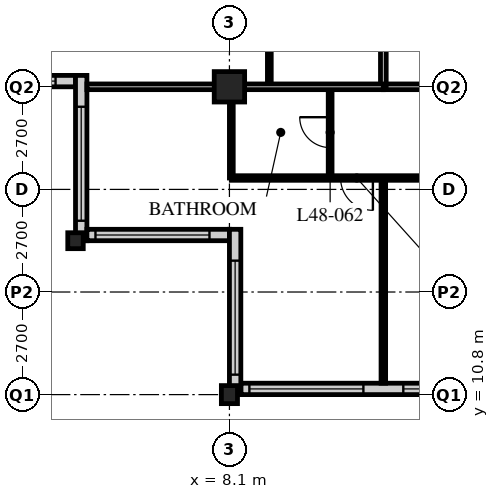
"""IFC4 building model, lengths in metres.
Left out: names, types, materials, properties, quantities, classifications, styles, units other than length and angle.
Written with IfcOpenShell. Run it as: python <this file> out.ifc"""

import sys

from ifc_helpers import new_model, si_unit, direction, frame, frame_2d, origin, origin_2d, place, context, subcontext, project, spatial, rectangle, hollow_rectangle, i_section, extrude, element, fill, save


model = new_model("IFC4")
c1 = context("Model", 3, precision=1e-05, world=origin(), true_north=direction((0.0, 1.0)))
c2 = subcontext(c1, "Body", "Model", "MODEL_VIEW")
j1 = project(units=[si_unit("LENGTHUNIT", "METRE"), si_unit("PLANEANGLEUNIT", "RADIAN")], contexts=[c1])
p1 = place(None, origin())
s1 = spatial("IfcSite", under=j1, at=p1, CompositionType="ELEMENT")
p2 = place(p1, origin())
s2 = spatial("IfcBuilding", under=s1, at=p2, CompositionType="ELEMENT")
p3 = place(p2, frame((0.0, 0.0, 188.4)))
s3 = spatial("IfcBuildingStorey", under=s2, at=p3, CompositionType="ELEMENT", Elevation=188.4)
p4 = place(p3, frame((4.05, 14.85, 0.0), z_axis=(0.0, 0.0, 1.0), x_axis=(1.0, 0.0, 0.0)))
e1 = element("IfcColumn", 1, at=p4, inside=s3, PredefinedType="COLUMN", context=c2, shape_type="SweptSolid", body=[
    extrude(i_section(OverallWidth=0.407, OverallDepth=0.419, WebThickness=0.031, FlangeThickness=0.049, FilletRadius=0.015, at=origin_2d()), origin(), (0.0, 0.0, 1.0), 3.6),
])
p5 = place(p3, frame((8.1, 10.8, 0.0), z_axis=(0.0, 0.0, 1.0), x_axis=(1.0, 0.0, 0.0)))
e2 = element("IfcColumn", 2, at=p5, inside=s3, PredefinedType="COLUMN", context=c2, shape_type="SweptSolid", body=[
    extrude(i_section(OverallWidth=0.424, OverallDepth=0.475, WebThickness=0.048, FlangeThickness=0.077, FilletRadius=0.015, at=origin_2d()), origin(), (0.0, 0.0, 1.0), 3.6),
])
p6 = place(p3, frame((8.1, 18.9, 0.0), z_axis=(0.0, 0.0, 1.0), x_axis=(1.0, 0.0, 0.0)))
e3 = element("IfcColumn", 3, at=p6, inside=s3, PredefinedType="COLUMN", context=c2, shape_type="SweptSolid", body=[
    extrude(hollow_rectangle(XDim=0.8, YDim=0.8, WallThickness=0.08, at=origin_2d()), origin(), (0.0, 0.0, 1.0), 3.6),
])
p7 = place(p3, frame((8.4, 10.95, 0.0), z_axis=(0.0, 0.0, 1.0), x_axis=(1.0, 0.0, 0.0)))
e4 = element("IfcWall", 4, at=p7, inside=s3, PredefinedType="SOLIDWALL", context=c2, shape_type="SweptSolid", body=[
    extrude(rectangle(XDim=40.2, YDim=0.3, at=frame_2d((20.1, 0.0))), origin(), (0.0, 0.0, 1.0), 3.39),
])
p8 = place(p7, frame((0.225, 0.0, 0.6)))
e5 = element("IfcOpeningElement", 5, at=p8, cuts=e4, PredefinedType="OPENING", context=c2, shape_type="SweptSolid", body=[
    extrude(rectangle(XDim=3.0, YDim=2.4, at=frame_2d((1.5, 1.2))), frame((0.0, 0.16, 0.0), z_axis=(0.0, -1.0, 0.0), x_axis=(1.0, 0.0, 0.0)), (0.0, 0.0, 1.0), 0.32),
])
p9 = place(p7, frame((4.275, 0.0, 0.6)))
e6 = element("IfcOpeningElement", 6, at=p9, cuts=e4, PredefinedType="OPENING", context=c2, shape_type="SweptSolid", body=[
    extrude(rectangle(XDim=3.0, YDim=2.4, at=frame_2d((1.5, 1.2))), frame((0.0, 0.16, 0.0), z_axis=(0.0, -1.0, 0.0), x_axis=(1.0, 0.0, 0.0)), (0.0, 0.0, 1.0), 0.32),
])
p10 = place(p7, frame((8.325, 0.0, 0.6)))
e7 = element("IfcOpeningElement", 7, at=p10, cuts=e4, PredefinedType="OPENING", context=c2, shape_type="SweptSolid", body=[
    extrude(rectangle(XDim=3.0, YDim=2.4, at=frame_2d((1.5, 1.2))), frame((0.0, 0.16, 0.0), z_axis=(0.0, -1.0, 0.0), x_axis=(1.0, 0.0, 0.0)), (0.0, 0.0, 1.0), 0.32),
])
p11 = place(p7, frame((12.375, 0.0, 0.6)))
e8 = element("IfcOpeningElement", 8, at=p11, cuts=e4, PredefinedType="OPENING", context=c2, shape_type="SweptSolid", body=[
    extrude(rectangle(XDim=3.0, YDim=2.4, at=frame_2d((1.5, 1.2))), frame((0.0, 0.16, 0.0), z_axis=(0.0, -1.0, 0.0), x_axis=(1.0, 0.0, 0.0)), (0.0, 0.0, 1.0), 0.32),
])
p12 = place(p7, frame((16.425, 0.0, 0.6)))
e9 = element("IfcOpeningElement", 9, at=p12, cuts=e4, PredefinedType="OPENING", context=c2, shape_type="SweptSolid", body=[
    extrude(rectangle(XDim=3.0, YDim=2.4, at=frame_2d((1.5, 1.2))), frame((0.0, 0.16, 0.0), z_axis=(0.0, -1.0, 0.0), x_axis=(1.0, 0.0, 0.0)), (0.0, 0.0, 1.0), 0.32),
])
p13 = place(p7, frame((20.475, 0.0, 0.6)))
e10 = element("IfcOpeningElement", 10, at=p13, cuts=e4, PredefinedType="OPENING", context=c2, shape_type="SweptSolid", body=[
    extrude(rectangle(XDim=3.0, YDim=2.4, at=frame_2d((1.5, 1.2))), frame((0.0, 0.16, 0.0), z_axis=(0.0, -1.0, 0.0), x_axis=(1.0, 0.0, 0.0)), (0.0, 0.0, 1.0), 0.32),
])
p14 = place(p7, frame((24.525, 0.0, 0.6)))
e11 = element("IfcOpeningElement", 11, at=p14, cuts=e4, PredefinedType="OPENING", context=c2, shape_type="SweptSolid", body=[
    extrude(rectangle(XDim=3.0, YDim=2.4, at=frame_2d((1.5, 1.2))), frame((0.0, 0.16, 0.0), z_axis=(0.0, -1.0, 0.0), x_axis=(1.0, 0.0, 0.0)), (0.0, 0.0, 1.0), 0.32),
])
p15 = place(p7, frame((28.575, 0.0, 0.6)))
e12 = element("IfcOpeningElement", 12, at=p15, cuts=e4, PredefinedType="OPENING", context=c2, shape_type="SweptSolid", body=[
    extrude(rectangle(XDim=3.0, YDim=2.4, at=frame_2d((1.5, 1.2))), frame((0.0, 0.16, 0.0), z_axis=(0.0, -1.0, 0.0), x_axis=(1.0, 0.0, 0.0)), (0.0, 0.0, 1.0), 0.32),
])
p16 = place(p7, frame((32.625, 0.0, 0.6)))
e13 = element("IfcOpeningElement", 13, at=p16, cuts=e4, PredefinedType="OPENING", context=c2, shape_type="SweptSolid", body=[
    extrude(rectangle(XDim=3.0, YDim=2.4, at=frame_2d((1.5, 1.2))), frame((0.0, 0.16, 0.0), z_axis=(0.0, -1.0, 0.0), x_axis=(1.0, 0.0, 0.0)), (0.0, 0.0, 1.0), 0.32),
])
p17 = place(p7, frame((36.675, 0.0, 0.6)))
e14 = element("IfcOpeningElement", 14, at=p17, cuts=e4, PredefinedType="OPENING", context=c2, shape_type="SweptSolid", body=[
    extrude(rectangle(XDim=3.0, YDim=2.4, at=frame_2d((1.5, 1.2))), frame((0.0, 0.16, 0.0), z_axis=(0.0, -1.0, 0.0), x_axis=(1.0, 0.0, 0.0)), (0.0, 0.0, 1.0), 0.32),
])
p18 = place(p3, frame((0.3, 19.05, 0.0), z_axis=(0.0, 0.0, 1.0), x_axis=(1.0, 0.0, 0.0)))
e15 = element("IfcWall", 15, at=p18, inside=s3, PredefinedType="SOLIDWALL", context=c2, shape_type="SweptSolid", body=[
    extrude(rectangle(XDim=3.75, YDim=0.3, at=frame_2d((1.875, 0.0))), origin(), (0.0, 0.0, 1.0), 3.39),
])
p19 = place(p18, frame((0.225, 0.0, 0.6)))
e16 = element("IfcOpeningElement", 16, at=p19, cuts=e15, PredefinedType="OPENING", context=c2, shape_type="SweptSolid", body=[
    extrude(rectangle(XDim=3.0, YDim=2.0, at=frame_2d((1.5, 1.0))), frame((0.0, 0.16, 0.0), z_axis=(0.0, -1.0, 0.0), x_axis=(1.0, 0.0, 0.0)), (0.0, 0.0, 1.0), 0.32),
])
p20 = place(p3, frame((4.2, 19.2, 0.0), z_axis=(0.0, 0.0, 1.0), x_axis=(0.0, -1.0, 0.0)))
e17 = element("IfcWall", 17, at=p20, inside=s3, PredefinedType="SOLIDWALL", context=c2, shape_type="SweptSolid", body=[
    extrude(rectangle(XDim=4.35, YDim=0.3, at=frame_2d((2.175, 0.0))), origin(), (0.0, 0.0, 1.0), 3.39),
])
p21 = place(p20, frame((0.825, 0.0, 0.6)))
e18 = element("IfcOpeningElement", 18, at=p21, cuts=e17, PredefinedType="OPENING", context=c2, shape_type="SweptSolid", body=[
    extrude(rectangle(XDim=3.0, YDim=2.0, at=frame_2d((1.5, 1.0))), frame((0.0, 0.16, 0.0), z_axis=(0.0, -1.0, 0.0), x_axis=(1.0, 0.0, 0.0)), (0.0, 0.0, 1.0), 0.32),
])
p22 = place(p3, frame((4.35, 15.0, 0.0), z_axis=(0.0, 0.0, 1.0), x_axis=(1.0, 0.0, 0.0)))
e19 = element("IfcWall", 19, at=p22, inside=s3, PredefinedType="SOLIDWALL", context=c2, shape_type="SweptSolid", body=[
    extrude(rectangle(XDim=3.75, YDim=0.3, at=frame_2d((1.875, 0.0))), origin(), (0.0, 0.0, 1.0), 3.39),
])
p23 = place(p22, frame((0.225, 0.0, 0.6)))
e20 = element("IfcOpeningElement", 20, at=p23, cuts=e19, PredefinedType="OPENING", context=c2, shape_type="SweptSolid", body=[
    extrude(rectangle(XDim=3.0, YDim=2.0, at=frame_2d((1.5, 1.0))), frame((0.0, 0.16, 0.0), z_axis=(0.0, -1.0, 0.0), x_axis=(1.0, 0.0, 0.0)), (0.0, 0.0, 1.0), 0.32),
])
p24 = place(p3, frame((8.25, 15.15, 0.0), z_axis=(0.0, 0.0, 1.0), x_axis=(0.0, -1.0, 0.0)))
e21 = element("IfcWall", 21, at=p24, inside=s3, PredefinedType="SOLIDWALL", context=c2, shape_type="SweptSolid", body=[
    extrude(rectangle(XDim=4.35, YDim=0.3, at=frame_2d((2.175, 0.0))), origin(), (0.0, 0.0, 1.0), 3.39),
])
p25 = place(p24, frame((0.825, 0.0, 0.6)))
e22 = element("IfcOpeningElement", 22, at=p25, cuts=e21, PredefinedType="OPENING", context=c2, shape_type="SweptSolid", body=[
    extrude(rectangle(XDim=3.0, YDim=2.0, at=frame_2d((1.5, 1.0))), frame((0.0, 0.16, 0.0), z_axis=(0.0, -1.0, 0.0), x_axis=(1.0, 0.0, 0.0)), (0.0, 0.0, 1.0), 0.32),
])
p26 = place(p3, frame((12.15, 18.9, 0.0), z_axis=(0.0, 0.0, 1.0), x_axis=(1.0, 0.0, 0.0)))
e23 = element("IfcWall", 23, at=p26, inside=s3, PredefinedType="PARTITIONING", context=c2, shape_type="SweptSolid", body=[
    extrude(rectangle(XDim=32.4, YDim=0.15, at=frame_2d((16.2, 0.0))), origin(), (0.0, 0.0, 1.0), 2.778),
])
p27 = place(p26, frame((4.95, 0.0, 0.0)))
e24 = element("IfcOpeningElement", 24, at=p27, cuts=e23, PredefinedType="OPENING", context=c2, shape_type="SweptSolid", body=[
    extrude(rectangle(XDim=1.0, YDim=2.1, at=frame_2d((0.5, 1.05))), frame((0.0, 0.085, 0.0), z_axis=(0.0, -1.0, 0.0), x_axis=(1.0, 0.0, 0.0)), (0.0, 0.0, 1.0), 0.17),
])
p28 = place(p26, frame((13.05, 0.0, 0.0)))
e25 = element("IfcOpeningElement", 25, at=p28, cuts=e23, PredefinedType="OPENING", context=c2, shape_type="SweptSolid", body=[
    extrude(rectangle(XDim=1.0, YDim=2.1, at=frame_2d((0.5, 1.05))), frame((0.0, 0.085, 0.0), z_axis=(0.0, -1.0, 0.0), x_axis=(1.0, 0.0, 0.0)), (0.0, 0.0, 1.0), 0.17),
])
p29 = place(p26, frame((21.15, 0.0, 0.0)))
e26 = element("IfcOpeningElement", 26, at=p29, cuts=e23, PredefinedType="OPENING", context=c2, shape_type="SweptSolid", body=[
    extrude(rectangle(XDim=1.0, YDim=2.1, at=frame_2d((0.5, 1.05))), frame((0.0, 0.085, 0.0), z_axis=(0.0, -1.0, 0.0), x_axis=(1.0, 0.0, 0.0)), (0.0, 0.0, 1.0), 0.17),
])
p30 = place(p26, frame((1.525, 0.0, 0.0)))
e27 = element("IfcOpeningElement", 27, at=p30, cuts=e23, PredefinedType="OPENING", context=c2, shape_type="SweptSolid", body=[
    extrude(rectangle(XDim=1.0, YDim=2.1, at=frame_2d((0.5, 1.05))), frame((0.0, 0.085, 0.0), z_axis=(0.0, -1.0, 0.0), x_axis=(1.0, 0.0, 0.0)), (0.0, 0.0, 1.0), 0.17),
])
p31 = place(p26, frame((29.875, 0.0, 0.0)))
e28 = element("IfcOpeningElement", 28, at=p31, cuts=e23, PredefinedType="OPENING", context=c2, shape_type="SweptSolid", body=[
    extrude(rectangle(XDim=1.0, YDim=2.1, at=frame_2d((0.5, 1.05))), frame((0.0, 0.085, 0.0), z_axis=(0.0, -1.0, 0.0), x_axis=(1.0, 0.0, 0.0)), (0.0, 0.0, 1.0), 0.17),
])
p32 = place(p3, frame((12.15, 18.9, 0.0), z_axis=(0.0, 0.0, 1.0), x_axis=(0.0, 1.0, 0.0)))
e29 = element("IfcWall", 29, at=p32, inside=s3, PredefinedType="PARTITIONING", context=c2, shape_type="SweptSolid", body=[
    extrude(rectangle(XDim=28.35, YDim=0.15, at=frame_2d((14.175, 0.0))), origin(), (0.0, 0.0, 1.0), 3.39),
])
p33 = place(p32, frame((2.35, 0.0, 0.0)))
e30 = element("IfcOpeningElement", 30, at=p33, cuts=e29, PredefinedType="OPENING", context=c2, shape_type="SweptSolid", body=[
    extrude(rectangle(XDim=1.0, YDim=2.1, at=frame_2d((0.5, 1.05))), frame((0.0, 0.085, 0.0), z_axis=(0.0, -1.0, 0.0), x_axis=(1.0, 0.0, 0.0)), (0.0, 0.0, 1.0), 0.17),
])
p34 = place(p32, frame((6.4, 0.0, 0.0)))
e31 = element("IfcOpeningElement", 31, at=p34, cuts=e29, PredefinedType="OPENING", context=c2, shape_type="SweptSolid", body=[
    extrude(rectangle(XDim=1.0, YDim=2.1, at=frame_2d((0.5, 1.05))), frame((0.0, 0.085, 0.0), z_axis=(0.0, -1.0, 0.0), x_axis=(1.0, 0.0, 0.0)), (0.0, 0.0, 1.0), 0.17),
])
p35 = place(p32, frame((8.5, 0.0, 0.0)))
e32 = element("IfcOpeningElement", 32, at=p35, cuts=e29, PredefinedType="OPENING", context=c2, shape_type="SweptSolid", body=[
    extrude(rectangle(XDim=1.0, YDim=2.1, at=frame_2d((0.5, 1.05))), frame((0.0, 0.085, 0.0), z_axis=(0.0, -1.0, 0.0), x_axis=(1.0, 0.0, 0.0)), (0.0, 0.0, 1.0), 0.17),
])
p36 = place(p32, frame((16.6, 0.0, 0.0)))
e33 = element("IfcOpeningElement", 33, at=p36, cuts=e29, PredefinedType="OPENING", context=c2, shape_type="SweptSolid", body=[
    extrude(rectangle(XDim=1.0, YDim=2.1, at=frame_2d((0.5, 1.05))), frame((0.0, 0.085, 0.0), z_axis=(0.0, -1.0, 0.0), x_axis=(1.0, 0.0, 0.0)), (0.0, 0.0, 1.0), 0.17),
])
p37 = place(p32, frame((26.65, 0.0, 0.0)))
e34 = element("IfcOpeningElement", 34, at=p37, cuts=e29, PredefinedType="OPENING", context=c2, shape_type="SweptSolid", body=[
    extrude(rectangle(XDim=1.0, YDim=2.1, at=frame_2d((0.5, 1.05))), frame((0.0, 0.085, 0.0), z_axis=(0.0, -1.0, 0.0), x_axis=(1.0, 0.0, 0.0)), (0.0, 0.0, 1.0), 0.17),
])
p38 = place(p3, frame((9.15, 18.9, 0.0), z_axis=(0.0, 0.0, 1.0), x_axis=(0.0, 1.0, 0.0)))
e35 = element("IfcWall", 35, at=p38, inside=s3, PredefinedType="PARTITIONING", context=c2, shape_type="SweptSolid", body=[
    extrude(rectangle(XDim=2.2, YDim=0.1, at=frame_2d((1.1, 0.0))), origin(), (0.0, 0.0, 1.0), 3.39),
])
p39 = place(p3, frame((10.75, 18.9, 0.0), z_axis=(0.0, 0.0, 1.0), x_axis=(0.0, -1.0, 0.0)))
e36 = element("IfcWall", 36, at=p39, inside=s3, PredefinedType="PARTITIONING", context=c2, shape_type="SweptSolid", body=[
    extrude(rectangle(XDim=2.4, YDim=0.1, at=frame_2d((1.2, 0.0))), origin(), (0.0, 0.0, 1.0), 3.39),
])
p40 = place(p39, frame((0.8, 0.0, 0.0)))
e37 = element("IfcOpeningElement", 37, at=p40, cuts=e36, PredefinedType="OPENING", context=c2, shape_type="SweptSolid", body=[
    extrude(rectangle(XDim=0.8, YDim=2.1, at=frame_2d((0.4, 1.05))), frame((0.0, 0.06, 0.0), z_axis=(0.0, -1.0, 0.0), x_axis=(1.0, 0.0, 0.0)), (0.0, 0.0, 1.0), 0.12),
])
p41 = place(p3, frame((8.15, 18.9, 0.0), z_axis=(0.0, 0.0, 1.0), x_axis=(0.0, -1.0, 0.0)))
e38 = element("IfcWall", 38, at=p41, inside=s3, PredefinedType="PARTITIONING", context=c2, shape_type="SweptSolid", body=[
    extrude(rectangle(XDim=2.4, YDim=0.1, at=frame_2d((1.2, 0.0))), origin(), (0.0, 0.0, 1.0), 2.778),
])
p42 = place(p3, frame((8.15, 16.5, 0.0), z_axis=(0.0, 0.0, 1.0), x_axis=(1.0, 0.0, 0.0)))
e39 = element("IfcWall", 39, at=p42, inside=s3, PredefinedType="PARTITIONING", context=c2, shape_type="SweptSolid", body=[
    extrude(rectangle(XDim=40.4, YDim=0.12, at=frame_2d((20.2, 0.0))), origin(), (0.0, 0.0, 1.0), 3.39),
])
p43 = place(p42, frame((9.025, 0.0, 0.0)))
e40 = element("IfcOpeningElement", 40, at=p43, cuts=e39, PredefinedType="OPENING", context=c2, shape_type="SweptSolid", body=[
    extrude(rectangle(XDim=0.85, YDim=2.1, at=frame_2d((0.425, 1.05))), frame((0.0, 0.07, 0.0), z_axis=(0.0, -1.0, 0.0), x_axis=(1.0, 0.0, 0.0)), (0.0, 0.0, 1.0), 0.14),
])
p44 = place(p42, frame((12.425, 0.0, 0.0)))
e41 = element("IfcOpeningElement", 41, at=p44, cuts=e39, PredefinedType="OPENING", context=c2, shape_type="SweptSolid", body=[
    extrude(rectangle(XDim=0.85, YDim=2.1, at=frame_2d((0.425, 1.05))), frame((0.0, 0.07, 0.0), z_axis=(0.0, -1.0, 0.0), x_axis=(1.0, 0.0, 0.0)), (0.0, 0.0, 1.0), 0.14),
])
p45 = place(p42, frame((17.125, 0.0, 0.0)))
e42 = element("IfcOpeningElement", 42, at=p45, cuts=e39, PredefinedType="OPENING", context=c2, shape_type="SweptSolid", body=[
    extrude(rectangle(XDim=0.85, YDim=2.1, at=frame_2d((0.425, 1.05))), frame((0.0, 0.07, 0.0), z_axis=(0.0, -1.0, 0.0), x_axis=(1.0, 0.0, 0.0)), (0.0, 0.0, 1.0), 0.14),
])
p46 = place(p42, frame((20.525, 0.0, 0.0)))
e43 = element("IfcOpeningElement", 43, at=p46, cuts=e39, PredefinedType="OPENING", context=c2, shape_type="SweptSolid", body=[
    extrude(rectangle(XDim=0.85, YDim=2.1, at=frame_2d((0.425, 1.05))), frame((0.0, 0.07, 0.0), z_axis=(0.0, -1.0, 0.0), x_axis=(1.0, 0.0, 0.0)), (0.0, 0.0, 1.0), 0.14),
])
p47 = place(p42, frame((25.225, 0.0, 0.0)))
e44 = element("IfcOpeningElement", 44, at=p47, cuts=e39, PredefinedType="OPENING", context=c2, shape_type="SweptSolid", body=[
    extrude(rectangle(XDim=0.85, YDim=2.1, at=frame_2d((0.425, 1.05))), frame((0.0, 0.07, 0.0), z_axis=(0.0, -1.0, 0.0), x_axis=(1.0, 0.0, 0.0)), (0.0, 0.0, 1.0), 0.14),
])
p48 = place(p42, frame((28.625, 0.0, 0.0)))
e45 = element("IfcOpeningElement", 45, at=p48, cuts=e39, PredefinedType="OPENING", context=c2, shape_type="SweptSolid", body=[
    extrude(rectangle(XDim=0.85, YDim=2.1, at=frame_2d((0.425, 1.05))), frame((0.0, 0.07, 0.0), z_axis=(0.0, -1.0, 0.0), x_axis=(1.0, 0.0, 0.0)), (0.0, 0.0, 1.0), 0.14),
])
p49 = place(p42, frame((6.725, 0.0, 0.0)))
e46 = element("IfcOpeningElement", 46, at=p49, cuts=e39, PredefinedType="OPENING", context=c2, shape_type="SweptSolid", body=[
    extrude(rectangle(XDim=0.85, YDim=2.1, at=frame_2d((0.425, 1.05))), frame((0.0, 0.07, 0.0), z_axis=(0.0, -1.0, 0.0), x_axis=(1.0, 0.0, 0.0)), (0.0, 0.0, 1.0), 0.14),
])
p50 = place(p42, frame((2.875, 0.0, 0.0)))
e47 = element("IfcOpeningElement", 47, at=p50, cuts=e39, PredefinedType="OPENING", context=c2, shape_type="SweptSolid", body=[
    extrude(rectangle(XDim=0.85, YDim=2.1, at=frame_2d((0.425, 1.05))), frame((0.0, 0.07, 0.0), z_axis=(0.0, -1.0, 0.0), x_axis=(1.0, 0.0, 0.0)), (0.0, 0.0, 1.0), 0.14),
])
p51 = place(p42, frame((32.825, 0.0, 0.0)))
e48 = element("IfcOpeningElement", 48, at=p51, cuts=e39, PredefinedType="OPENING", context=c2, shape_type="SweptSolid", body=[
    extrude(rectangle(XDim=0.85, YDim=2.1, at=frame_2d((0.425, 1.05))), frame((0.0, 0.07, 0.0), z_axis=(0.0, -1.0, 0.0), x_axis=(1.0, 0.0, 0.0)), (0.0, 0.0, 1.0), 0.14),
])
p52 = place(p42, frame((36.675, 0.0, 0.0)))
e49 = element("IfcOpeningElement", 49, at=p52, cuts=e39, PredefinedType="OPENING", context=c2, shape_type="SweptSolid", body=[
    extrude(rectangle(XDim=0.85, YDim=2.1, at=frame_2d((0.425, 1.05))), frame((0.0, 0.07, 0.0), z_axis=(0.0, -1.0, 0.0), x_axis=(1.0, 0.0, 0.0)), (0.0, 0.0, 1.0), 0.14),
])
p53 = place(p3, frame((12.15, 16.5, 0.0), z_axis=(0.0, 0.0, 1.0), x_axis=(0.0, -1.0, 0.0)))
e50 = element("IfcWall", 50, at=p53, inside=s3, PredefinedType="PARTITIONING", context=c2, shape_type="SweptSolid", body=[
    extrude(rectangle(XDim=5.4, YDim=0.12, at=frame_2d((2.7, 0.0))), origin(), (0.0, 0.0, 1.0), 3.39),
])
p54 = place(p3, frame((4.35, 18.9, 0.0), z_axis=(0.0, 0.0, 1.0), x_axis=(1.0, 0.0, 0.0)))
e51 = element("IfcWall", 51, at=p54, inside=s3, PredefinedType="PARTITIONING", context=c2, shape_type="SweptSolid", body=[
    extrude(rectangle(XDim=7.8, YDim=0.15, at=frame_2d((3.9, 0.0))), origin(), (0.0, 0.0, 1.0), 2.778),
])
p55 = place(p8, origin())
e52 = element("IfcWindow", 52, at=p55, inside=s3, PartitioningType="SINGLE_PANEL", PredefinedType="WINDOW", context=c2, shape_type="SweptSolid", body=[
    extrude(rectangle(XDim=3.0, YDim=2.4, at=frame_2d((1.5, 1.2))), frame((0.0, 0.03, 0.0), z_axis=(0.0, -1.0, 0.0), x_axis=(1.0, 0.0, 0.0)), (0.0, 0.0, 1.0), 0.06),
])
fill(e5, e52)
p56 = place(p9, origin())
e53 = element("IfcWindow", 53, at=p56, inside=s3, PartitioningType="SINGLE_PANEL", PredefinedType="WINDOW", context=c2, shape_type="SweptSolid", body=[
    extrude(rectangle(XDim=3.0, YDim=2.4, at=frame_2d((1.5, 1.2))), frame((0.0, 0.03, 0.0), z_axis=(0.0, -1.0, 0.0), x_axis=(1.0, 0.0, 0.0)), (0.0, 0.0, 1.0), 0.06),
])
fill(e6, e53)
p57 = place(p19, origin())
e54 = element("IfcWindow", 54, at=p57, inside=s3, PartitioningType="SINGLE_PANEL", PredefinedType="WINDOW", context=c2, shape_type="SweptSolid", body=[
    extrude(rectangle(XDim=3.0, YDim=2.0, at=frame_2d((1.5, 1.0))), frame((0.0, 0.03, 0.0), z_axis=(0.0, -1.0, 0.0), x_axis=(1.0, 0.0, 0.0)), (0.0, 0.0, 1.0), 0.06),
])
fill(e16, e54)
p58 = place(p21, origin())
e55 = element("IfcWindow", 55, at=p58, inside=s3, PartitioningType="SINGLE_PANEL", PredefinedType="WINDOW", context=c2, shape_type="SweptSolid", body=[
    extrude(rectangle(XDim=3.0, YDim=2.0, at=frame_2d((1.5, 1.0))), frame((0.0, 0.03, 0.0), z_axis=(0.0, -1.0, 0.0), x_axis=(1.0, 0.0, 0.0)), (0.0, 0.0, 1.0), 0.06),
])
fill(e18, e55)
p59 = place(p23, origin())
e56 = element("IfcWindow", 56, at=p59, inside=s3, PartitioningType="SINGLE_PANEL", PredefinedType="WINDOW", context=c2, shape_type="SweptSolid", body=[
    extrude(rectangle(XDim=3.0, YDim=2.0, at=frame_2d((1.5, 1.0))), frame((0.0, 0.03, 0.0), z_axis=(0.0, -1.0, 0.0), x_axis=(1.0, 0.0, 0.0)), (0.0, 0.0, 1.0), 0.06),
])
fill(e20, e56)
p60 = place(p25, origin())
e57 = element("IfcWindow", 57, at=p60, inside=s3, PartitioningType="SINGLE_PANEL", PredefinedType="WINDOW", context=c2, shape_type="SweptSolid", body=[
    extrude(rectangle(XDim=3.0, YDim=2.0, at=frame_2d((1.5, 1.0))), frame((0.0, 0.03, 0.0), z_axis=(0.0, -1.0, 0.0), x_axis=(1.0, 0.0, 0.0)), (0.0, 0.0, 1.0), 0.06),
])
fill(e22, e57)
p61 = place(p40, origin())
e58 = element("IfcDoor", 58, at=p61, inside=s3, OperationType="SINGLE_SWING_RIGHT", PredefinedType="DOOR", context=c2, shape_type="SweptSolid", body=[
    extrude(rectangle(XDim=0.8, YDim=2.1, at=frame_2d((0.4, 1.05))), frame((0.0, 0.025, 0.0), z_axis=(0.0, -1.0, 0.0), x_axis=(1.0, 0.0, 0.0)), (0.0, 0.0, 1.0), 0.05),
])
fill(e37, e58)
p62 = place(p50, origin())
e59 = element("IfcDoor", 59, at=p62, inside=s3, OperationType="SINGLE_SWING_LEFT", PredefinedType="DOOR", context=c2, shape_type="SweptSolid", body=[
    extrude(rectangle(XDim=0.85, YDim=2.1, at=frame_2d((0.425, 1.05))), frame((0.0, 0.025, 0.0), z_axis=(0.0, -1.0, 0.0), x_axis=(1.0, 0.0, 0.0)), (0.0, 0.0, 1.0), 0.05),
])
fill(e47, e59)
save(model, sys.argv[1])
